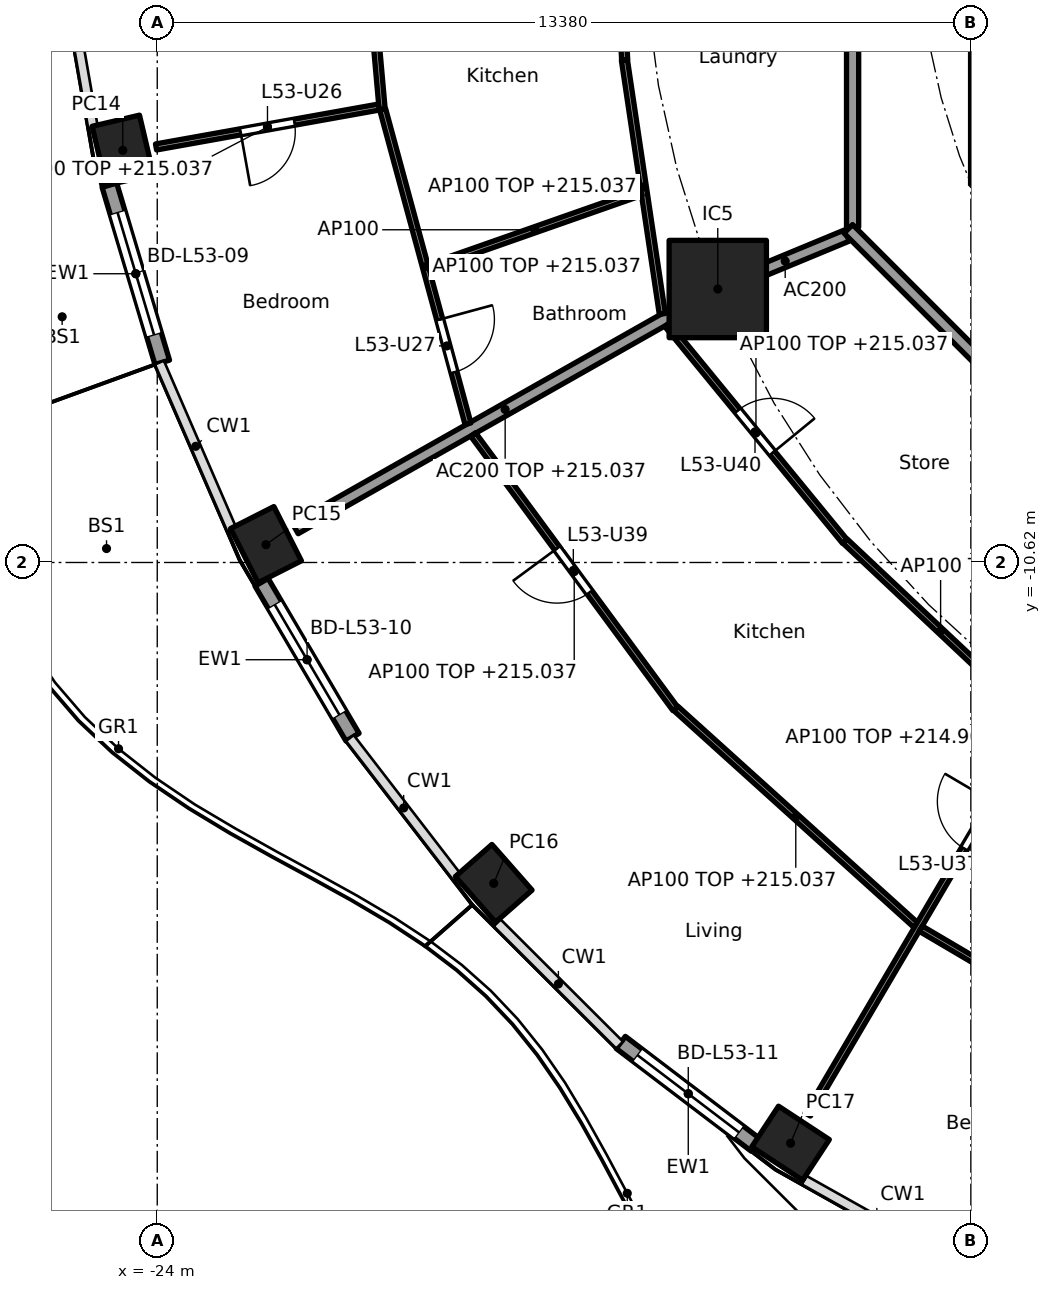
"""IFC4 building model, lengths in metres.
Left out: names, types, materials, properties, quantities, classifications, styles, units other than length and angle.
Written with IfcOpenShell. Run it as: python <this file> out.ifc"""

import sys

from ifc_helpers import new_model, si_unit, direction, frame, frame_2d, origin, origin_2d, place, context, subcontext, project, spatial, polyline, rectangle, hollow_rectangle, outline, extrude, element, fill, save


model = new_model("IFC4")
c1 = context("Model", 3, precision=1e-05, world=origin(), true_north=direction((0.0, 1.0)))
c2 = subcontext(c1, "Body", "Model", "MODEL_VIEW")
j1 = project(units=[si_unit("LENGTHUNIT", "METRE"), si_unit("PLANEANGLEUNIT", "RADIAN")], contexts=[c1])
p1 = place(None, origin())
s1 = spatial("IfcSite", under=j1, at=p1, CompositionType="ELEMENT")
p2 = place(p1, origin())
s2 = spatial("IfcBuilding", under=s1, at=p2, CompositionType="ELEMENT")
p3 = place(p2, frame((0.0, 0.0, 212.2)))
s3 = spatial("IfcBuildingStorey", under=s2, at=p3, CompositionType="ELEMENT", Elevation=212.2)
for number, where, z_axis, x_axis in (
    (1, (-24.567, -3.842, -0.26), (0.0, 0.0, 1.0), (0.229, -0.973, 0.0)),
    (2, (-22.212, -10.327, -0.26), (0.0, 0.0, 1.0), (0.452, -0.892, 0.0)),
    (3, (-18.467, -15.896, -0.26), (0.0, 0.0, 1.0), (0.66, -0.751, 0.0)),
    (4, (-13.585, -20.17, -0.26), (0.0, 0.0, 1.0), (0.836, -0.549, 0.0)),
):
    element("IfcColumn", number, at=place(p3, frame(where, z_axis=z_axis, x_axis=x_axis)), inside=s3, PredefinedType="COLUMN", context=c2, shape_type="SweptSolid", body=[
        extrude(hollow_rectangle(XDim=1.0, YDim=0.8, WallThickness=0.032, at=origin_2d()), origin(), (0.0, 0.0, 1.0), 3.96),
    ])
p4 = place(p3, frame((-14.782, -6.123, 0.0), z_axis=(0.0, 0.0, 1.0), x_axis=(1.0, 0.0, 0.0)))
e5 = element("IfcColumn", 5, at=p4, inside=s3, PredefinedType="COLUMN", context=c2, shape_type="SweptSolid", body=[
    extrude(rectangle(XDim=1.6, YDim=1.6, at=origin_2d()), origin(), (0.0, 0.0, 1.0), 3.7),
])
p5 = place(p3, frame((-23.918, -7.328, 0.0), z_axis=(0.0, 0.0, 1.0), x_axis=(-0.285859454825, 0.95827155446, 0.0)))
e6 = element("IfcWall", 6, at=p5, inside=s3, PredefinedType="SOLIDWALL", context=c2, shape_type="SweptSolid", body=[
    extrude(rectangle(XDim=3.041, YDim=0.25, at=frame_2d((1.52, 0.0))), origin(), (0.0, 0.0, 1.0), 3.44),
])
p6 = place(p5, frame((0.47, 0.0, 0.0)))
e7 = element("IfcOpeningElement", 7, at=p6, cuts=e6, PredefinedType="OPENING", context=c2, shape_type="SweptSolid", body=[
    extrude(rectangle(XDim=2.1, YDim=2.4, at=frame_2d((1.05, 1.2))), frame((0.0, 0.135, 0.0), z_axis=(0.0, -1.0, 0.0), x_axis=(1.0, 0.0, 0.0)), (0.0, 0.0, 1.0), 0.27),
])
p7 = place(p3, frame((-20.788, -13.493, 0.0), z_axis=(0.0, 0.0, 1.0), x_axis=(-0.506294090973, 0.862360883532, 0.0)))
e8 = element("IfcWall", 8, at=p7, inside=s3, PredefinedType="SOLIDWALL", context=c2, shape_type="SweptSolid", body=[
    extrude(rectangle(XDim=2.955, YDim=0.25, at=frame_2d((1.477, 0.0))), origin(), (0.0, 0.0, 1.0), 3.44),
])
p8 = place(p7, frame((0.427, 0.0, 0.0)))
e9 = element("IfcOpeningElement", 9, at=p8, cuts=e8, PredefinedType="OPENING", context=c2, shape_type="SweptSolid", body=[
    extrude(rectangle(XDim=2.1, YDim=2.4, at=frame_2d((1.05, 1.2))), frame((0.0, 0.135, 0.0), z_axis=(0.0, -1.0, 0.0), x_axis=(1.0, 0.0, 0.0)), (0.0, 0.0, 1.0), 0.27),
])
p9 = place(p3, frame((-14.157, -20.201, 0.0), z_axis=(0.0, 0.0, 1.0), x_axis=(-0.795990084031, 0.60530966135, 0.0)))
e10 = element("IfcWall", 10, at=p9, inside=s3, PredefinedType="SOLIDWALL", context=c2, shape_type="SweptSolid", body=[
    extrude(rectangle(XDim=2.789, YDim=0.25, at=frame_2d((1.394, 0.0))), origin(), (0.0, 0.0, 1.0), 3.44),
])
p10 = place(p9, frame((0.344, 0.0, 0.0)))
e11 = element("IfcOpeningElement", 11, at=p10, cuts=e10, PredefinedType="OPENING", context=c2, shape_type="SweptSolid", body=[
    extrude(rectangle(XDim=2.1, YDim=2.4, at=frame_2d((1.05, 1.2))), frame((0.0, 0.135, 0.0), z_axis=(0.0, -1.0, 0.0), x_axis=(1.0, 0.0, 0.0)), (0.0, 0.0, 1.0), 0.27),
])
p11 = place(p3, frame((-10.325, 3.801, 0.0), z_axis=(0.0, 0.0, 1.0), x_axis=(0.0, -1.0, 0.0)))
e12 = element("IfcWall", 12, at=p11, inside=s3, PredefinedType="SHEAR", context=c2, shape_type="SweptSolid", body=[
    extrude(rectangle(XDim=7.602, YDim=0.6, at=frame_2d((3.801, 0.0))), origin(), (0.0, 0.0, 1.0), 3.44),
])
p12 = place(p11, frame((0.651, 0.0, 0.0)))
e13 = element("IfcOpeningElement", 13, at=p12, cuts=e12, PredefinedType="OPENING", context=c2, shape_type="SweptSolid", body=[
    extrude(rectangle(XDim=1.5, YDim=2.1, at=frame_2d((0.75, 1.05))), frame((0.0, 0.31, 0.0), z_axis=(0.0, -1.0, 0.0), x_axis=(1.0, 0.0, 0.0)), (0.0, 0.0, 1.0), 0.62),
])
p13 = place(p11, frame((5.451, 0.0, 0.0)))
e14 = element("IfcOpeningElement", 14, at=p13, cuts=e12, PredefinedType="OPENING", context=c2, shape_type="SweptSolid", body=[
    extrude(rectangle(XDim=1.5, YDim=2.1, at=frame_2d((0.75, 1.05))), frame((0.0, 0.31, 0.0), z_axis=(0.0, -1.0, 0.0), x_axis=(1.0, 0.0, 0.0)), (0.0, 0.0, 1.0), 0.62),
])
p14 = place(p3, origin())
e15 = element("IfcWall", 15, at=p14, inside=s3, PredefinedType="SHEAR", context=c2, shape_type="SweptSolid", body=[
    extrude(outline(polyline([(-10.625, -3.801), (-10.025, -3.801), (-10.025, -4.152), (-9.776, -4.401), (-10.2, -4.825), (-10.625, -4.401), (-10.625, -3.801)])), origin(), (0.0, 0.0, 1.0), 3.44),
])
p15 = place(p3, frame((-12.657, -5.243, 0.0), z_axis=(0.0, 0.0, 1.0), x_axis=(-0.923859888513, -0.38273085373, 0.0)))
e16 = element("IfcWall", 16, at=p15, inside=s3, PredefinedType="PARTITIONING", context=c2, shape_type="SweptSolid", body=[
    extrude(rectangle(XDim=2.199, YDim=0.2, at=frame_2d((1.1, 0.0))), origin(), (0.0, 0.0, 1.0), 3.44),
])
p16 = place(p3, frame((-14.825, -6.148, 0.0), z_axis=(0.0, 0.0, 1.0), x_axis=(-0.870099576105, -0.492875975944, 0.0)))
e17 = element("IfcWall", 17, at=p16, inside=s3, PredefinedType="PARTITIONING", context=c2, shape_type="SweptSolid", body=[
    extrude(rectangle(XDim=7.937, YDim=0.2, at=frame_2d((3.969, 0.0))), origin(), (0.0, 0.0, 1.0), 2.837),
])
p17 = place(p3, frame((-12.565, 5.304, 0.0), z_axis=(0.0, 0.0, 1.0), x_axis=(0.0, -1.0, 0.0)))
e18 = element("IfcWall", 18, at=p17, inside=s3, PredefinedType="PARTITIONING", context=c2, shape_type="SweptSolid", body=[
    extrude(rectangle(XDim=10.409, YDim=0.2, at=frame_2d((5.205, 0.0))), origin(), (0.0, 0.0, 1.0), 3.44),
])
p18 = place(p17, frame((3.07, 0.0, 0.0)))
e19 = element("IfcOpeningElement", 19, at=p18, cuts=e18, PredefinedType="OPENING", context=c2, shape_type="SweptSolid", body=[
    extrude(rectangle(XDim=1.0, YDim=2.1, at=frame_2d((0.5, 1.05))), frame((0.0, 0.11, 0.0), z_axis=(0.0, -1.0, 0.0), x_axis=(1.0, 0.0, 0.0)), (0.0, 0.0, 1.0), 0.22),
])
p19 = place(p3, frame((-12.635, -5.134, 0.0), z_axis=(0.0, 0.0, 1.0), x_axis=(0.707106781187, -0.707106781187, 0.0)))
e20 = element("IfcWall", 20, at=p19, inside=s3, PredefinedType="PARTITIONING", context=c2, shape_type="SweptSolid", body=[
    extrude(rectangle(XDim=10.609, YDim=0.2, at=frame_2d((5.305, 0.0))), origin(), (0.0, 0.0, 1.0), 3.44),
])
p20 = place(p3, frame((-20.81, 2.542, 0.0), z_axis=(0.0, 0.0, 1.0), x_axis=(0.088651453697, -0.996062708748, 0.0)))
e21 = element("IfcWall", 21, at=p20, inside=s3, PredefinedType="PARTITIONING", context=c2, shape_type="SweptSolid", body=[
    extrude(rectangle(XDim=5.737, YDim=0.1, at=frame_2d((2.868, 0.0))), origin(), (0.0, 0.0, 1.0), 2.837),
])
p21 = place(p3, frame((-16.431, -0.178, 0.0), z_axis=(0.0, 0.0, 1.0), x_axis=(0.053951127036, -0.998543577362, 0.0)))
e22 = element("IfcWall", 22, at=p21, inside=s3, PredefinedType="PARTITIONING", context=c2, shape_type="SweptSolid", body=[
    extrude(rectangle(XDim=2.181, YDim=0.1, at=frame_2d((1.091, 0.0))), origin(), (0.0, 0.0, 1.0), 3.44),
])
p22 = place(p3, frame((-16.318, -2.356, 0.0), z_axis=(0.0, 0.0, 1.0), x_axis=(0.147684413341, -0.989034536331, 0.0)))
e23 = element("IfcWall", 23, at=p22, inside=s3, PredefinedType="PARTITIONING", context=c2, shape_type="SweptSolid", body=[
    extrude(rectangle(XDim=4.222, YDim=0.1, at=frame_2d((2.111, 0.0))), origin(), (0.0, 0.0, 1.0), 2.837),
])
p23 = place(p3, frame((-20.355, -3.13, 0.0), z_axis=(0.0, 0.0, 1.0), x_axis=(-0.984331377639, -0.1763284974, 0.0)))
e24 = element("IfcWall", 24, at=p23, inside=s3, PredefinedType="PARTITIONING", context=c2, shape_type="SweptSolid", body=[
    extrude(rectangle(XDim=3.723, YDim=0.1, at=frame_2d((1.862, 0.0))), origin(), (0.0, 0.0, 1.0), 2.837),
])
p24 = place(p23, frame((1.412, 0.0, 0.0)))
e25 = element("IfcOpeningElement", 25, at=p24, cuts=e24, PredefinedType="OPENING", context=c2, shape_type="SweptSolid", body=[
    extrude(rectangle(XDim=0.9, YDim=2.1, at=frame_2d((0.45, 1.05))), frame((0.0, 0.06, 0.0), z_axis=(0.0, -1.0, 0.0), x_axis=(1.0, 0.0, 0.0)), (0.0, 0.0, 1.0), 0.12),
])
p25 = place(p3, frame((-20.292, -3.17, 0.0), z_axis=(0.0, 0.0, 1.0), x_axis=(0.26187906236, -0.965100697698, 0.0)))
e26 = element("IfcWall", 26, at=p25, inside=s3, PredefinedType="PARTITIONING", context=c2, shape_type="SweptSolid", body=[
    extrude(rectangle(XDim=5.356, YDim=0.1, at=frame_2d((2.678, 0.0))), origin(), (0.0, 0.0, 1.0), 2.837),
])
p26 = place(p25, frame((3.579, 0.0, 0.0)))
e27 = element("IfcOpeningElement", 27, at=p26, cuts=e26, PredefinedType="OPENING", context=c2, shape_type="SweptSolid", body=[
    extrude(rectangle(XDim=0.9, YDim=2.1, at=frame_2d((0.45, 1.05))), frame((0.0, 0.06, 0.0), z_axis=(0.0, -1.0, 0.0), x_axis=(1.0, 0.0, 0.0)), (0.0, 0.0, 1.0), 0.12),
])
p27 = place(p3, frame((-16.042, -4.535, 0.0), z_axis=(0.0, 0.0, 1.0), x_axis=(-0.94358986717, -0.331116539265, 0.0)))
e28 = element("IfcWall", 28, at=p27, inside=s3, PredefinedType="PARTITIONING", context=c2, shape_type="SweptSolid", body=[
    extrude(rectangle(XDim=3.704, YDim=0.1, at=frame_2d((1.852, 0.0))), origin(), (0.0, 0.0, 1.0), 3.44),
])
p28 = place(p3, frame((-15.616, -6.708, 0.0), z_axis=(0.0, 0.0, 1.0), x_axis=(0.634076422357, -0.773270386483, 0.0)))
e29 = element("IfcWall", 29, at=p28, inside=s3, PredefinedType="PARTITIONING", context=c2, shape_type="SweptSolid", body=[
    extrude(rectangle(XDim=4.611, YDim=0.1, at=frame_2d((2.306, 0.0))), origin(), (0.0, 0.0, 1.0), 2.837),
])
p29 = place(p28, frame((1.831, 0.0, 0.0)))
e30 = element("IfcOpeningElement", 30, at=p29, cuts=e29, PredefinedType="OPENING", context=c2, shape_type="SweptSolid", body=[
    extrude(rectangle(XDim=0.9, YDim=2.1, at=frame_2d((0.45, 1.05))), frame((0.0, 0.06, 0.0), z_axis=(0.0, -1.0, 0.0), x_axis=(1.0, 0.0, 0.0)), (0.0, 0.0, 1.0), 0.12),
])
p30 = place(p3, frame((-18.804, -8.516, 0.0), z_axis=(0.0, 0.0, 1.0), x_axis=(0.593249583583, -0.805018590828, 0.0)))
e31 = element("IfcWall", 31, at=p30, inside=s3, PredefinedType="PARTITIONING", context=c2, shape_type="SweptSolid", body=[
    extrude(rectangle(XDim=5.602, YDim=0.1, at=frame_2d((2.801, 0.0))), origin(), (0.0, 0.0, 1.0), 2.837),
])
p31 = place(p30, frame((2.326, 0.0, 0.0)))
e32 = element("IfcOpeningElement", 32, at=p31, cuts=e31, PredefinedType="OPENING", context=c2, shape_type="SweptSolid", body=[
    extrude(rectangle(XDim=0.9, YDim=2.1, at=frame_2d((0.45, 1.05))), frame((0.0, 0.06, 0.0), z_axis=(0.0, -1.0, 0.0), x_axis=(1.0, 0.0, 0.0)), (0.0, 0.0, 1.0), 0.12),
])
p32 = place(p3, frame((-12.688, -10.27, 0.0), z_axis=(0.0, 0.0, 1.0), x_axis=(0.728268142903, -0.685292282192, 0.0)))
e33 = element("IfcWall", 33, at=p32, inside=s3, PredefinedType="PARTITIONING", context=c2, shape_type="SweptSolid", body=[
    extrude(rectangle(XDim=4.312, YDim=0.1, at=frame_2d((2.156, 0.0))), origin(), (0.0, 0.0, 1.0), 2.837),
])
p33 = place(p3, frame((-15.474, -13.019, 0.0), z_axis=(0.0, 0.0, 1.0), x_axis=(0.742348572616, -0.670013878017, 0.0)))
e34 = element("IfcWall", 34, at=p33, inside=s3, PredefinedType="PARTITIONING", context=c2, shape_type="SweptSolid", body=[
    extrude(rectangle(XDim=5.319, YDim=0.1, at=frame_2d((2.66, 0.0))), origin(), (0.0, 0.0, 1.0), 2.837),
])
p34 = place(p3, frame((-7.709, -10.198, 0.0), z_axis=(0.0, 0.0, 1.0), x_axis=(-0.507355901053, -0.8617366127, 0.0)))
e35 = element("IfcWall", 35, at=p34, inside=s3, PredefinedType="PARTITIONING", context=c2, shape_type="SweptSolid", body=[
    extrude(rectangle(XDim=11.025, YDim=0.1, at=frame_2d((5.512, 0.0))), origin(), (0.0, 0.0, 1.0), 2.762),
])
p35 = place(p34, frame((5.05, 0.0, 0.0)))
e36 = element("IfcOpeningElement", 36, at=p35, cuts=e35, PredefinedType="OPENING", context=c2, shape_type="SweptSolid", body=[
    extrude(rectangle(XDim=0.9, YDim=2.1, at=frame_2d((0.45, 1.05))), frame((0.0, 0.06, 0.0), z_axis=(0.0, -1.0, 0.0), x_axis=(1.0, 0.0, 0.0)), (0.0, 0.0, 1.0), 0.12),
])
p36 = place(p3, frame((-11.445, -16.641, 0.0), z_axis=(0.0, 0.0, 1.0), x_axis=(0.861562560957, -0.507651409489, 0.0)))
e37 = element("IfcWall", 37, at=p36, inside=s3, PredefinedType="PARTITIONING", context=c2, shape_type="SweptSolid", body=[
    extrude(rectangle(XDim=4.985, YDim=0.1, at=frame_2d((2.492, 0.0))), origin(), (0.0, 0.0, 1.0), 2.837),
])
p37 = place(p36, frame((2.042, 0.0, 0.0)))
e38 = element("IfcOpeningElement", 38, at=p37, cuts=e37, PredefinedType="OPENING", context=c2, shape_type="SweptSolid", body=[
    extrude(rectangle(XDim=0.9, YDim=2.1, at=frame_2d((0.45, 1.05))), frame((0.0, 0.06, 0.0), z_axis=(0.0, -1.0, 0.0), x_axis=(1.0, 0.0, 0.0)), (0.0, 0.0, 1.0), 0.12),
])
p38 = place(p6, origin())
e39 = element("IfcDoor", 39, at=p38, inside=s3, OperationType="SLIDING_TO_LEFT", PredefinedType="DOOR", context=c2, shape_type="SweptSolid", body=[
    extrude(rectangle(XDim=2.1, YDim=2.4, at=frame_2d((1.05, 1.2))), frame((0.0, 0.025, 0.0), z_axis=(0.0, -1.0, 0.0), x_axis=(1.0, 0.0, 0.0)), (0.0, 0.0, 1.0), 0.05),
])
fill(e7, e39)
p39 = place(p8, origin())
e40 = element("IfcDoor", 40, at=p39, inside=s3, OperationType="SLIDING_TO_LEFT", PredefinedType="DOOR", context=c2, shape_type="SweptSolid", body=[
    extrude(rectangle(XDim=2.1, YDim=2.4, at=frame_2d((1.05, 1.2))), frame((0.0, 0.025, 0.0), z_axis=(0.0, -1.0, 0.0), x_axis=(1.0, 0.0, 0.0)), (0.0, 0.0, 1.0), 0.05),
])
fill(e9, e40)
p40 = place(p10, origin())
e41 = element("IfcDoor", 41, at=p40, inside=s3, OperationType="SLIDING_TO_LEFT", PredefinedType="DOOR", context=c2, shape_type="SweptSolid", body=[
    extrude(rectangle(XDim=2.1, YDim=2.4, at=frame_2d((1.05, 1.2))), frame((0.0, 0.025, 0.0), z_axis=(0.0, -1.0, 0.0), x_axis=(1.0, 0.0, 0.0)), (0.0, 0.0, 1.0), 0.05),
])
fill(e11, e41)
p41 = place(p24, origin())
e42 = element("IfcDoor", 42, at=p41, inside=s3, OperationType="SINGLE_SWING_RIGHT", PredefinedType="DOOR", context=c2, shape_type="SweptSolid", body=[
    extrude(rectangle(XDim=0.9, YDim=2.1, at=frame_2d((0.45, 1.05))), frame((0.0, 0.025, 0.0), z_axis=(0.0, -1.0, 0.0), x_axis=(1.0, 0.0, 0.0)), (0.0, 0.0, 1.0), 0.05),
])
fill(e25, e42)
p42 = place(p26, origin())
e43 = element("IfcDoor", 43, at=p42, inside=s3, OperationType="SINGLE_SWING_LEFT", PredefinedType="DOOR", context=c2, shape_type="SweptSolid", body=[
    extrude(rectangle(XDim=0.9, YDim=2.1, at=frame_2d((0.45, 1.05))), frame((0.0, 0.025, 0.0), z_axis=(0.0, -1.0, 0.0), x_axis=(1.0, 0.0, 0.0)), (0.0, 0.0, 1.0), 0.05),
])
fill(e27, e43)
p43 = place(p35, frame((0.9, 0.0, 0.0), x_axis=(-1.0, 0.0, 0.0)))
e44 = element("IfcDoor", 44, at=p43, inside=s3, OperationType="SINGLE_SWING_RIGHT", PredefinedType="DOOR", context=c2, shape_type="SweptSolid", body=[
    extrude(rectangle(XDim=0.9, YDim=2.1, at=frame_2d((0.45, 1.05))), frame((0.0, 0.025, 0.0), z_axis=(0.0, -1.0, 0.0), x_axis=(1.0, 0.0, 0.0)), (0.0, 0.0, 1.0), 0.05),
])
fill(e36, e44)
p44 = place(p31, frame((0.9, 0.0, 0.0), x_axis=(-1.0, 0.0, 0.0)))
e45 = element("IfcDoor", 45, at=p44, inside=s3, OperationType="SINGLE_SWING_RIGHT", PredefinedType="DOOR", context=c2, shape_type="SweptSolid", body=[
    extrude(rectangle(XDim=0.9, YDim=2.1, at=frame_2d((0.45, 1.05))), frame((0.0, 0.025, 0.0), z_axis=(0.0, -1.0, 0.0), x_axis=(1.0, 0.0, 0.0)), (0.0, 0.0, 1.0), 0.05),
])
fill(e32, e45)
p45 = place(p29, origin())
e46 = element("IfcDoor", 46, at=p45, inside=s3, OperationType="SINGLE_SWING_RIGHT", PredefinedType="DOOR", context=c2, shape_type="SweptSolid", body=[
    extrude(rectangle(XDim=0.9, YDim=2.1, at=frame_2d((0.45, 1.05))), frame((0.0, 0.025, 0.0), z_axis=(0.0, -1.0, 0.0), x_axis=(1.0, 0.0, 0.0)), (0.0, 0.0, 1.0), 0.05),
])
fill(e30, e46)
save(model, sys.argv[1])
